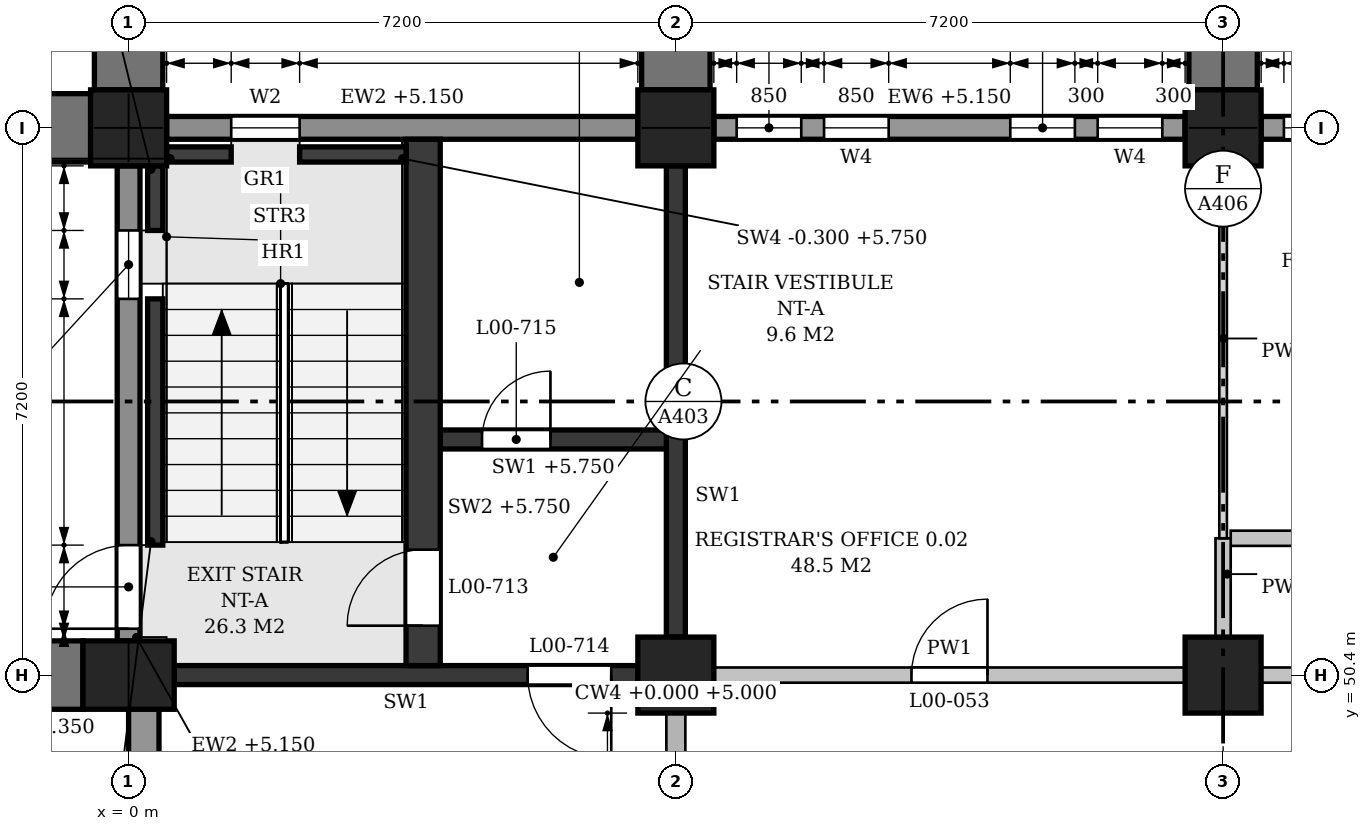
"""IFC4 building model, lengths in metres.
Left out: names, types, materials, properties, quantities, classifications, styles, units other than length and angle.
Written with IfcOpenShell. Run it as: python <this file> out.ifc"""

import sys

from ifc_helpers import new_model, si_unit, direction, frame, frame_2d, origin, origin_2d, place, context, subcontext, project, spatial, polyline, rectangle, outline, extrude, element, fill, save


model = new_model("IFC4")
c1 = context("Model", 3, precision=1e-05, world=origin(), true_north=direction((0.0, 1.0)))
c2 = subcontext(c1, "Body", "Model", "MODEL_VIEW")
j1 = project(units=[si_unit("LENGTHUNIT", "METRE"), si_unit("PLANEANGLEUNIT", "RADIAN")], contexts=[c1])
p1 = place(None, origin())
s1 = spatial("IfcSite", under=j1, at=p1, CompositionType="ELEMENT")
p2 = place(p1, origin())
s2 = spatial("IfcBuilding", under=s1, at=p2, CompositionType="ELEMENT")
p3 = place(p2, origin())
s3 = spatial("IfcBuildingStorey", under=s2, at=p3, CompositionType="ELEMENT", Elevation=0.0)
p4 = place(p3, frame((0.0, 50.4, 0.0), z_axis=(0.0, 0.0, 1.0), x_axis=(1.0, 0.0, 0.0)))
e1 = element("IfcColumn", 1, at=p4, inside=s3, PredefinedType="COLUMN", context=c2, shape_type="SweptSolid", body=[
    extrude(rectangle(XDim=1.2, YDim=0.9, at=origin_2d()), origin(), (0.0, 0.0, 1.0), 6.0),
])
for number, where, z_axis, x_axis in (
    (2, (0.0, 57.6, 0.0), (0.0, 0.0, 1.0), (1.0, 0.0, 0.0)),
    (3, (7.2, 50.4, 0.0), (0.0, 0.0, 1.0), (1.0, 0.0, 0.0)),
    (4, (7.2, 57.6, 0.0), (0.0, 0.0, 1.0), (1.0, 0.0, 0.0)),
    (5, (14.4, 50.4, 0.0), (0.0, 0.0, 1.0), (1.0, 0.0, 0.0)),
    (6, (14.4, 57.6, 0.0), (0.0, 0.0, 1.0), (1.0, 0.0, 0.0)),
):
    element("IfcColumn", number, at=place(p3, frame(where, z_axis=z_axis, x_axis=x_axis)), inside=s3, PredefinedType="COLUMN", context=c2, shape_type="SweptSolid", body=[
        extrude(rectangle(XDim=1.0, YDim=1.0, at=origin_2d()), origin(), (0.0, 0.0, 1.0), 6.0),
    ])
p5 = place(p3, frame((0.0, 50.85, 0.0), z_axis=(0.0, 0.0, 1.0), x_axis=(0.0, 1.0, 0.0)))
e7 = element("IfcWall", 7, at=p5, inside=s3, PredefinedType="STANDARD", context=c2, shape_type="SweptSolid", body=[
    extrude(rectangle(XDim=6.25, YDim=0.3, at=frame_2d((3.125, 0.0))), origin(), (0.0, 0.0, 1.0), 5.15),
])
p6 = place(p5, frame((0.16, 0.0, 0.0)))
e8 = element("IfcOpeningElement", 8, at=p6, cuts=e7, PredefinedType="OPENING", context=c2, shape_type="SweptSolid", body=[
    extrude(rectangle(XDim=1.1, YDim=2.1, at=frame_2d((0.55, 1.05))), frame((0.0, 0.16, 0.0), z_axis=(0.0, -1.0, 0.0), x_axis=(1.0, 0.0, 0.0)), (0.0, 0.0, 1.0), 0.32),
])
p7 = place(p5, frame((4.5, 0.0, 0.9)))
e9 = element("IfcOpeningElement", 9, at=p7, cuts=e7, PredefinedType="OPENING", context=c2, shape_type="SweptSolid", body=[
    extrude(outline(polyline([(0.0, 0.0), (0.9, 0.0), (0.9, 3.55), (0.45, 4.0), (0.0, 3.55), (0.0, 0.0)])), frame((0.0, 0.16, 0.0), z_axis=(0.0, -1.0, 0.0), x_axis=(1.0, 0.0, 0.0)), (0.0, 0.0, 1.0), 0.32),
])
p8 = place(p3, frame((21.1, 57.6, 0.0), z_axis=(0.0, 0.0, 1.0), x_axis=(-1.0, 0.0, 0.0)))
e10 = element("IfcWall", 10, at=p8, inside=s3, PredefinedType="STANDARD", context=c2, shape_type="SweptSolid", body=[
    extrude(rectangle(XDim=6.2, YDim=0.3, at=frame_2d((3.1, 0.0))), origin(), (0.0, 0.0, 1.0), 5.15),
])
p9 = place(p8, frame((0.3, 0.0, 0.9)))
e11 = element("IfcOpeningElement", 11, at=p9, cuts=e10, PredefinedType="OPENING", context=c2, shape_type="SweptSolid", body=[
    extrude(outline(polyline([(0.0, 0.0), (0.85, 0.0), (0.85, 3.55), (0.425, 4.0), (0.0, 3.55), (0.0, 0.0)])), frame((0.0, 0.16, 0.0), z_axis=(0.0, -1.0, 0.0), x_axis=(1.0, 0.0, 0.0)), (0.0, 0.0, 1.0), 0.32),
])
p10 = place(p8, frame((1.45, 0.0, 0.9)))
e12 = element("IfcOpeningElement", 12, at=p10, cuts=e10, PredefinedType="OPENING", context=c2, shape_type="SweptSolid", body=[
    extrude(outline(polyline([(0.0, 0.0), (0.85, 0.0), (0.85, 3.55), (0.425, 4.0), (0.0, 3.55), (0.0, 0.0)])), frame((0.0, 0.16, 0.0), z_axis=(0.0, -1.0, 0.0), x_axis=(1.0, 0.0, 0.0)), (0.0, 0.0, 1.0), 0.32),
])
p11 = place(p8, frame((3.9, 0.0, 0.9)))
e13 = element("IfcOpeningElement", 13, at=p11, cuts=e10, PredefinedType="OPENING", context=c2, shape_type="SweptSolid", body=[
    extrude(outline(polyline([(0.0, 0.0), (0.85, 0.0), (0.85, 3.55), (0.425, 4.0), (0.0, 3.55), (0.0, 0.0)])), frame((0.0, 0.16, 0.0), z_axis=(0.0, -1.0, 0.0), x_axis=(1.0, 0.0, 0.0)), (0.0, 0.0, 1.0), 0.32),
])
p12 = place(p8, frame((5.05, 0.0, 0.9)))
e14 = element("IfcOpeningElement", 14, at=p12, cuts=e10, PredefinedType="OPENING", context=c2, shape_type="SweptSolid", body=[
    extrude(outline(polyline([(0.0, 0.0), (0.85, 0.0), (0.85, 3.55), (0.425, 4.0), (0.0, 3.55), (0.0, 0.0)])), frame((0.0, 0.16, 0.0), z_axis=(0.0, -1.0, 0.0), x_axis=(1.0, 0.0, 0.0)), (0.0, 0.0, 1.0), 0.32),
])
p13 = place(p3, frame((13.9, 57.6, 0.0), z_axis=(0.0, 0.0, 1.0), x_axis=(-1.0, 0.0, 0.0)))
e15 = element("IfcWall", 15, at=p13, inside=s3, PredefinedType="STANDARD", context=c2, shape_type="SweptSolid", body=[
    extrude(rectangle(XDim=6.2, YDim=0.3, at=frame_2d((3.1, 0.0))), origin(), (0.0, 0.0, 1.0), 5.15),
])
p14 = place(p13, frame((0.3, 0.0, 0.9)))
e16 = element("IfcOpeningElement", 16, at=p14, cuts=e15, PredefinedType="OPENING", context=c2, shape_type="SweptSolid", body=[
    extrude(outline(polyline([(0.0, 0.0), (0.85, 0.0), (0.85, 3.55), (0.425, 4.0), (0.0, 3.55), (0.0, 0.0)])), frame((0.0, 0.16, 0.0), z_axis=(0.0, -1.0, 0.0), x_axis=(1.0, 0.0, 0.0)), (0.0, 0.0, 1.0), 0.32),
])
p15 = place(p13, frame((1.45, 0.0, 0.9)))
e17 = element("IfcOpeningElement", 17, at=p15, cuts=e15, PredefinedType="OPENING", context=c2, shape_type="SweptSolid", body=[
    extrude(outline(polyline([(0.0, 0.0), (0.85, 0.0), (0.85, 3.55), (0.425, 4.0), (0.0, 3.55), (0.0, 0.0)])), frame((0.0, 0.16, 0.0), z_axis=(0.0, -1.0, 0.0), x_axis=(1.0, 0.0, 0.0)), (0.0, 0.0, 1.0), 0.32),
])
p16 = place(p13, frame((3.9, 0.0, 0.9)))
e18 = element("IfcOpeningElement", 18, at=p16, cuts=e15, PredefinedType="OPENING", context=c2, shape_type="SweptSolid", body=[
    extrude(outline(polyline([(0.0, 0.0), (0.85, 0.0), (0.85, 3.55), (0.425, 4.0), (0.0, 3.55), (0.0, 0.0)])), frame((0.0, 0.16, 0.0), z_axis=(0.0, -1.0, 0.0), x_axis=(1.0, 0.0, 0.0)), (0.0, 0.0, 1.0), 0.32),
])
p17 = place(p13, frame((5.05, 0.0, 0.9)))
e19 = element("IfcOpeningElement", 19, at=p17, cuts=e15, PredefinedType="OPENING", context=c2, shape_type="SweptSolid", body=[
    extrude(outline(polyline([(0.0, 0.0), (0.85, 0.0), (0.85, 3.55), (0.425, 4.0), (0.0, 3.55), (0.0, 0.0)])), frame((0.0, 0.16, 0.0), z_axis=(0.0, -1.0, 0.0), x_axis=(1.0, 0.0, 0.0)), (0.0, 0.0, 1.0), 0.32),
])
p18 = place(p3, frame((6.7, 57.6, 0.0), z_axis=(0.0, 0.0, 1.0), x_axis=(-1.0, 0.0, 0.0)))
e20 = element("IfcWall", 20, at=p18, inside=s3, PredefinedType="STANDARD", context=c2, shape_type="SweptSolid", body=[
    extrude(rectangle(XDim=6.2, YDim=0.3, at=frame_2d((3.1, 0.0))), origin(), (0.0, 0.0, 1.0), 5.15),
])
p19 = place(p18, frame((4.45, 0.0, 0.9)))
e21 = element("IfcOpeningElement", 21, at=p19, cuts=e20, PredefinedType="OPENING", context=c2, shape_type="SweptSolid", body=[
    extrude(outline(polyline([(0.0, 0.0), (0.9, 0.0), (0.9, 3.55), (0.45, 4.0), (0.0, 3.55), (0.0, 0.0)])), frame((0.0, 0.16, 0.0), z_axis=(0.0, -1.0, 0.0), x_axis=(1.0, 0.0, 0.0)), (0.0, 0.0, 1.0), 0.32),
])
p20 = place(p3, frame((0.2, 43.65, 0.0), z_axis=(0.0, 0.0, 1.0), x_axis=(0.0, 1.0, 0.0)))
e22 = element("IfcWall", 22, at=p20, inside=s3, PredefinedType="POLYGONAL", context=c2, shape_type="SweptSolid", body=[
    extrude(outline(polyline([(0.0, 0.0), (0.25, 0.0), (0.25, 3.2), (0.492, 3.433), (0.748, 3.651), (1.015, 3.854), (1.294, 4.041), (1.583, 4.211), (1.882, 4.365), (2.189, 4.501), (2.503, 4.619), (2.824, 4.719), (3.15, 4.8), (3.476, 4.719), (3.797, 4.619), (4.111, 4.501), (4.418, 4.365), (4.717, 4.211), (5.006, 4.041), (5.285, 3.854), (5.552, 3.651), (5.808, 3.433), (6.05, 3.2), (6.05, 0.0), (6.3, 0.0), (6.3, 5.15), (0.0, 5.15), (0.0, 0.0)])), frame((0.0, 0.2, 0.0), z_axis=(0.0, -1.0, 0.0), x_axis=(1.0, 0.0, 0.0)), (0.0, 0.0, 1.0), 0.4),
])
for number, where, z_axis, x_axis in (
    (23, (-0.6, 50.4, 0.0), (0.0, 0.0, 1.0), (-1.0, 0.0, 0.0)),
    (24, (-0.5, 57.6, 0.0), (0.0, 0.0, 1.0), (-1.0, 0.0, 0.0)),
    (25, (0.0, 58.1, 0.0), (0.0, 0.0, 1.0), (0.0, 1.0, 0.0)),
    (26, (7.2, 58.1, 0.0), (0.0, 0.0, 1.0), (0.0, 1.0, 0.0)),
    (27, (14.4, 58.1, 0.0), (0.0, 0.0, 1.0), (0.0, 1.0, 0.0)),
):
    element("IfcWall", number, at=place(p3, frame(where, z_axis=z_axis, x_axis=x_axis)), inside=s3, PredefinedType="POLYGONAL", context=c2, shape_type="SweptSolid", body=[
        extrude(outline(polyline([(1.6, 0.0), (1.6, 20.9), (1.3, 21.35), (0.0, 21.35), (0.0, 0.0), (1.6, 0.0)])), frame((0.0, 0.45, 0.0), z_axis=(0.0, -1.0, 0.0), x_axis=(1.0, 0.0, 0.0)), (0.0, 0.0, 1.0), 0.9),
    ])
p21 = place(p3, frame((0.6, 50.4, 0.0), z_axis=(0.0, 0.0, 1.0), x_axis=(1.0, 0.0, 0.0)))
e28 = element("IfcWall", 28, at=p21, inside=s3, PredefinedType="SHEAR", context=c2, shape_type="SweptSolid", body=[
    extrude(rectangle(XDim=6.1, YDim=0.25, at=frame_2d((3.05, 0.0))), origin(), (0.0, 0.0, 1.0), 5.0),
])
p22 = place(p21, frame((4.65, 0.0, 0.0)))
e29 = element("IfcOpeningElement", 29, at=p22, cuts=e28, PredefinedType="OPENING", context=c2, shape_type="SweptSolid", body=[
    extrude(rectangle(XDim=1.1, YDim=2.1, at=frame_2d((0.55, 1.05))), frame((0.0, 0.135, 0.0), z_axis=(0.0, -1.0, 0.0), x_axis=(1.0, 0.0, 0.0)), (0.0, 0.0, 1.0), 0.27),
])
p23 = place(p3, frame((7.2, 50.9, 0.0), z_axis=(0.0, 0.0, 1.0), x_axis=(0.0, 1.0, 0.0)))
e30 = element("IfcWall", 30, at=p23, inside=s3, PredefinedType="SHEAR", context=c2, shape_type="SweptSolid", body=[
    extrude(rectangle(XDim=6.2, YDim=0.25, at=frame_2d((3.1, 0.0))), origin(), (0.0, 0.0, 1.0), 5.0),
])
p24 = place(p3, frame((0.35, 52.11, -0.3), z_axis=(0.0, 0.0, 1.0), x_axis=(0.0, 1.0, 0.0)))
e31 = element("IfcWall", 31, at=p24, inside=s3, PredefinedType="SHEAR", context=c2, shape_type="SweptSolid", body=[
    extrude(rectangle(XDim=3.24, YDim=0.2, at=frame_2d((1.62, 0.0))), origin(), (0.0, 0.0, 1.0), 6.05),
])
for number, where, z_axis, x_axis in (
    (32, (0.35, 56.25, -0.3), (0.0, 0.0, 1.0), (0.0, 1.0, 0.0)),
    (33, (0.5, 57.25, -0.3), (0.0, 0.0, 1.0), (1.0, 0.0, 0.0)),
):
    element("IfcWall", number, at=place(p3, frame(where, z_axis=z_axis, x_axis=x_axis)), inside=s3, PredefinedType="SHEAR", context=c2, shape_type="SweptSolid", body=[
        extrude(rectangle(XDim=0.85, YDim=0.2, at=frame_2d((0.425, 0.0))), origin(), (0.0, 0.0, 1.0), 6.05),
    ])
p25 = place(p3, frame((2.25, 57.25, -0.3), z_axis=(0.0, 0.0, 1.0), x_axis=(1.0, 0.0, 0.0)))
e34 = element("IfcWall", 34, at=p25, inside=s3, PredefinedType="SHEAR", context=c2, shape_type="SweptSolid", body=[
    extrude(rectangle(XDim=1.4, YDim=0.2, at=frame_2d((0.7, 0.0))), origin(), (0.0, 0.0, 1.0), 6.05),
])
p26 = place(p3, frame((3.875, 50.525, 0.0), z_axis=(0.0, 0.0, 1.0), x_axis=(0.0, 1.0, 0.0)))
e35 = element("IfcWall", 35, at=p26, inside=s3, PredefinedType="SHEAR", context=c2, shape_type="SweptSolid", body=[
    extrude(rectangle(XDim=6.925, YDim=0.45, at=frame_2d((3.462, 0.0))), origin(), (0.0, 0.0, 1.0), 5.75),
])
p27 = place(p26, frame((0.525, 0.0, 0.0)))
e36 = element("IfcOpeningElement", 36, at=p27, cuts=e35, PredefinedType="OPENING", context=c2, shape_type="SweptSolid", body=[
    extrude(rectangle(XDim=1.0, YDim=2.1, at=frame_2d((0.5, 1.05))), frame((0.0, 0.235, 0.0), z_axis=(0.0, -1.0, 0.0), x_axis=(1.0, 0.0, 0.0)), (0.0, 0.0, 1.0), 0.47),
])
p28 = place(p3, frame((4.1, 53.5, 0.0), z_axis=(0.0, 0.0, 1.0), x_axis=(1.0, 0.0, 0.0)))
e37 = element("IfcWall", 37, at=p28, inside=s3, PredefinedType="SHEAR", context=c2, shape_type="SweptSolid", body=[
    extrude(rectangle(XDim=2.975, YDim=0.25, at=frame_2d((1.487, 0.0))), origin(), (0.0, 0.0, 1.0), 5.75),
])
p29 = place(p28, frame((0.55, 0.0, 0.0)))
e38 = element("IfcOpeningElement", 38, at=p29, cuts=e37, PredefinedType="OPENING", context=c2, shape_type="SweptSolid", body=[
    extrude(rectangle(XDim=0.9, YDim=2.1, at=frame_2d((0.45, 1.05))), frame((0.0, 0.135, 0.0), z_axis=(0.0, -1.0, 0.0), x_axis=(1.0, 0.0, 0.0)), (0.0, 0.0, 1.0), 0.27),
])
p30 = place(p3, frame((7.7, 50.4, 0.0), z_axis=(0.0, 0.0, 1.0), x_axis=(1.0, 0.0, 0.0)))
e39 = element("IfcWall", 39, at=p30, inside=s3, PredefinedType="PARTITIONING", context=c2, shape_type="SweptSolid", body=[
    extrude(rectangle(XDim=6.2, YDim=0.2, at=frame_2d((3.1, 0.0))), origin(), (0.0, 0.0, 1.0), 5.0),
])
p31 = place(p30, frame((2.6, 0.0, 0.0)))
e40 = element("IfcOpeningElement", 40, at=p31, cuts=e39, PredefinedType="OPENING", context=c2, shape_type="SweptSolid", body=[
    extrude(rectangle(XDim=1.0, YDim=2.1, at=frame_2d((0.5, 1.05))), frame((0.0, 0.11, 0.0), z_axis=(0.0, -1.0, 0.0), x_axis=(1.0, 0.0, 0.0)), (0.0, 0.0, 1.0), 0.22),
])
p32 = place(p3, frame((14.9, 50.4, 0.0), z_axis=(0.0, 0.0, 1.0), x_axis=(1.0, 0.0, 0.0)))
e41 = element("IfcWall", 41, at=p32, inside=s3, PredefinedType="PARTITIONING", context=c2, shape_type="SweptSolid", body=[
    extrude(rectangle(XDim=6.2, YDim=0.2, at=frame_2d((3.1, 0.0))), origin(), (0.0, 0.0, 1.0), 5.0),
])
p33 = place(p32, frame((2.6, 0.0, 0.0)))
e42 = element("IfcOpeningElement", 42, at=p33, cuts=e41, PredefinedType="OPENING", context=c2, shape_type="SweptSolid", body=[
    extrude(rectangle(XDim=1.0, YDim=2.1, at=frame_2d((0.5, 1.05))), frame((0.0, 0.11, 0.0), z_axis=(0.0, -1.0, 0.0), x_axis=(1.0, 0.0, 0.0)), (0.0, 0.0, 1.0), 0.22),
])
p34 = place(p3, frame((14.5, 52.2, 0.0), z_axis=(0.0, 0.0, 1.0), x_axis=(1.0, 0.0, 0.0)))
e43 = element("IfcWall", 43, at=p34, inside=s3, PredefinedType="PARTITIONING", context=c2, shape_type="SweptSolid", body=[
    extrude(outline(polyline([(0.0, 0.0), (6.975, 0.0), (6.975, 5.0), (6.85, 5.0), (6.85, 5.75), (0.15, 5.75), (0.15, 5.0), (0.0, 5.0), (0.0, 0.0)])), frame((0.0, 0.1, 0.0), z_axis=(0.0, -1.0, 0.0), x_axis=(1.0, 0.0, 0.0)), (0.0, 0.0, 1.0), 0.2),
])
p35 = place(p34, frame((1.25, 0.0, 0.0)))
e44 = element("IfcOpeningElement", 44, at=p35, cuts=e43, PredefinedType="OPENING", context=c2, shape_type="SweptSolid", body=[
    extrude(rectangle(XDim=1.0, YDim=2.1, at=frame_2d((0.5, 1.05))), frame((0.0, 0.11, 0.0), z_axis=(0.0, -1.0, 0.0), x_axis=(1.0, 0.0, 0.0)), (0.0, 0.0, 1.0), 0.22),
])
p36 = place(p34, frame((4.738, 0.0, 0.0)))
e45 = element("IfcOpeningElement", 45, at=p36, cuts=e43, PredefinedType="OPENING", context=c2, shape_type="SweptSolid", body=[
    extrude(rectangle(XDim=1.0, YDim=2.1, at=frame_2d((0.5, 1.05))), frame((0.0, 0.11, 0.0), z_axis=(0.0, -1.0, 0.0), x_axis=(1.0, 0.0, 0.0)), (0.0, 0.0, 1.0), 0.22),
])
p37 = place(p3, frame((14.4, 50.9, 0.0), z_axis=(0.0, 0.0, 1.0), x_axis=(0.0, 1.0, 0.0)))
e46 = element("IfcWall", 46, at=p37, inside=s3, PredefinedType="PARTITIONING", context=c2, shape_type="SweptSolid", body=[
    extrude(rectangle(XDim=1.3, YDim=0.2, at=frame_2d((0.65, 0.0))), origin(), (0.0, 0.0, 1.0), 5.0),
])
p38 = place(p3, frame((14.4, 52.2, 0.0), z_axis=(0.0, 0.0, 1.0), x_axis=(0.0, 1.0, 0.0)))
e47 = element("IfcWall", 47, at=p38, inside=s3, PredefinedType="PARTITIONING", context=c2, shape_type="SweptSolid", body=[
    extrude(rectangle(XDim=4.9, YDim=0.1, at=frame_2d((2.45, 0.0))), origin(), (0.0, 0.0, 1.0), 5.0),
])
p39 = place(p6, origin())
e48 = element("IfcDoor", 48, at=p39, inside=s3, OperationType="SINGLE_SWING_LEFT", PredefinedType="DOOR", context=c2, shape_type="SweptSolid", body=[
    extrude(rectangle(XDim=1.1, YDim=2.1, at=frame_2d((0.55, 1.05))), frame((0.0, 0.025, 0.0), z_axis=(0.0, -1.0, 0.0), x_axis=(1.0, 0.0, 0.0)), (0.0, 0.0, 1.0), 0.05),
])
fill(e8, e48)
p40 = place(p12, origin())
e49 = element("IfcWindow", 49, at=p40, inside=s3, PartitioningType="SINGLE_PANEL", PredefinedType="WINDOW", context=c2, shape_type="SweptSolid", body=[
    extrude(outline(polyline([(0.0, 0.0), (0.85, 0.0), (0.85, 3.55), (0.425, 4.0), (0.0, 3.55), (0.0, 0.0)])), frame((0.0, 0.03, 0.0), z_axis=(0.0, -1.0, 0.0), x_axis=(1.0, 0.0, 0.0)), (0.0, 0.0, 1.0), 0.06),
])
fill(e14, e49)
p41 = place(p14, origin())
e50 = element("IfcWindow", 50, at=p41, inside=s3, PartitioningType="SINGLE_PANEL", PredefinedType="WINDOW", context=c2, shape_type="SweptSolid", body=[
    extrude(outline(polyline([(0.0, 0.0), (0.85, 0.0), (0.85, 3.55), (0.425, 4.0), (0.0, 3.55), (0.0, 0.0)])), frame((0.0, 0.03, 0.0), z_axis=(0.0, -1.0, 0.0), x_axis=(1.0, 0.0, 0.0)), (0.0, 0.0, 1.0), 0.06),
])
fill(e16, e50)
p42 = place(p15, origin())
e51 = element("IfcWindow", 51, at=p42, inside=s3, PartitioningType="SINGLE_PANEL", PredefinedType="WINDOW", context=c2, shape_type="SweptSolid", body=[
    extrude(outline(polyline([(0.0, 0.0), (0.85, 0.0), (0.85, 3.55), (0.425, 4.0), (0.0, 3.55), (0.0, 0.0)])), frame((0.0, 0.03, 0.0), z_axis=(0.0, -1.0, 0.0), x_axis=(1.0, 0.0, 0.0)), (0.0, 0.0, 1.0), 0.06),
])
fill(e17, e51)
p43 = place(p16, origin())
e52 = element("IfcWindow", 52, at=p43, inside=s3, PartitioningType="SINGLE_PANEL", PredefinedType="WINDOW", context=c2, shape_type="SweptSolid", body=[
    extrude(outline(polyline([(0.0, 0.0), (0.85, 0.0), (0.85, 3.55), (0.425, 4.0), (0.0, 3.55), (0.0, 0.0)])), frame((0.0, 0.03, 0.0), z_axis=(0.0, -1.0, 0.0), x_axis=(1.0, 0.0, 0.0)), (0.0, 0.0, 1.0), 0.06),
])
fill(e18, e52)
p44 = place(p17, origin())
e53 = element("IfcWindow", 53, at=p44, inside=s3, PartitioningType="SINGLE_PANEL", PredefinedType="WINDOW", context=c2, shape_type="SweptSolid", body=[
    extrude(outline(polyline([(0.0, 0.0), (0.85, 0.0), (0.85, 3.55), (0.425, 4.0), (0.0, 3.55), (0.0, 0.0)])), frame((0.0, 0.03, 0.0), z_axis=(0.0, -1.0, 0.0), x_axis=(1.0, 0.0, 0.0)), (0.0, 0.0, 1.0), 0.06),
])
fill(e19, e53)
p45 = place(p19, origin())
e54 = element("IfcWindow", 54, at=p45, inside=s3, PartitioningType="SINGLE_PANEL", PredefinedType="WINDOW", context=c2, shape_type="SweptSolid", body=[
    extrude(outline(polyline([(0.0, 0.0), (0.9, 0.0), (0.9, 3.55), (0.45, 4.0), (0.0, 3.55), (0.0, 0.0)])), frame((0.0, 0.03, 0.0), z_axis=(0.0, -1.0, 0.0), x_axis=(1.0, 0.0, 0.0)), (0.0, 0.0, 1.0), 0.06),
])
fill(e21, e54)
p46 = place(p7, origin())
e55 = element("IfcWindow", 55, at=p46, inside=s3, PartitioningType="SINGLE_PANEL", PredefinedType="WINDOW", context=c2, shape_type="SweptSolid", body=[
    extrude(outline(polyline([(0.0, 0.0), (0.9, 0.0), (0.9, 3.55), (0.45, 4.0), (0.0, 3.55), (0.0, 0.0)])), frame((0.0, 0.03, 0.0), z_axis=(0.0, -1.0, 0.0), x_axis=(1.0, 0.0, 0.0)), (0.0, 0.0, 1.0), 0.06),
])
fill(e9, e55)
p47 = place(p27, origin())
e56 = element("IfcDoor", 56, at=p47, inside=s3, OperationType="SINGLE_SWING_LEFT", PredefinedType="DOOR", context=c2, shape_type="SweptSolid", body=[
    extrude(rectangle(XDim=1.0, YDim=2.1, at=frame_2d((0.5, 1.05))), frame((0.0, 0.025, 0.0), z_axis=(0.0, -1.0, 0.0), x_axis=(1.0, 0.0, 0.0)), (0.0, 0.0, 1.0), 0.05),
])
fill(e36, e56)
p48 = place(p22, frame((1.1, 0.0, 0.0), z_axis=(0.0, 0.0, 1.0), x_axis=(-1.0, 0.0, 0.0)))
e57 = element("IfcDoor", 57, at=p48, inside=s3, OperationType="SINGLE_SWING_LEFT", PredefinedType="DOOR", context=c2, shape_type="SweptSolid", body=[
    extrude(rectangle(XDim=1.1, YDim=2.1, at=frame_2d((0.55, 1.05))), frame((0.0, 0.025, 0.0), z_axis=(0.0, -1.0, 0.0), x_axis=(1.0, 0.0, 0.0)), (0.0, 0.0, 1.0), 0.05),
])
fill(e29, e57)
p49 = place(p29, origin())
e58 = element("IfcDoor", 58, at=p49, inside=s3, OperationType="SINGLE_SWING_RIGHT", PredefinedType="DOOR", context=c2, shape_type="SweptSolid", body=[
    extrude(rectangle(XDim=0.9, YDim=2.1, at=frame_2d((0.45, 1.05))), frame((0.0, 0.025, 0.0), z_axis=(0.0, -1.0, 0.0), x_axis=(1.0, 0.0, 0.0)), (0.0, 0.0, 1.0), 0.05),
])
fill(e38, e58)
p50 = place(p31, origin())
e59 = element("IfcDoor", 59, at=p50, inside=s3, OperationType="SINGLE_SWING_RIGHT", PredefinedType="DOOR", context=c2, shape_type="SweptSolid", body=[
    extrude(rectangle(XDim=1.0, YDim=2.1, at=frame_2d((0.5, 1.05))), frame((0.0, 0.025, 0.0), z_axis=(0.0, -1.0, 0.0), x_axis=(1.0, 0.0, 0.0)), (0.0, 0.0, 1.0), 0.05),
])
fill(e40, e59)
save(model, sys.argv[1])
